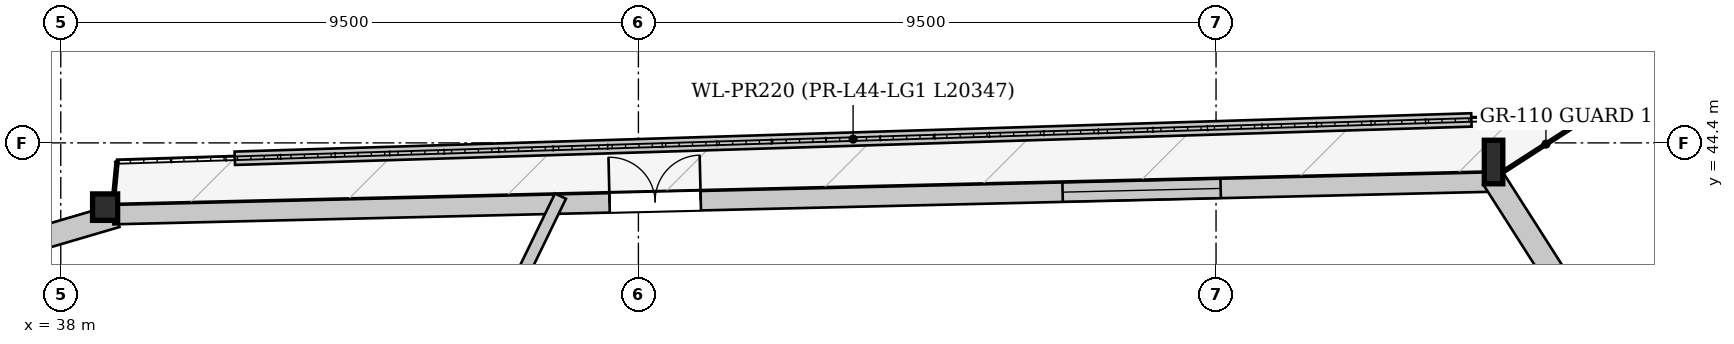
"""IFC4 building model, lengths in metres.
Left out: names, types, materials, properties, quantities, classifications, styles, units other than length and angle.
Written with IfcOpenShell. Run it as: python <this file> out.ifc"""

import sys

from ifc_helpers import new_model, si_unit, direction, frame, frame_2d, origin, origin_2d, place, context, subcontext, project, spatial, rectangle, i_section, extrude, source, transform, mapped, element, fill, save


model = new_model("IFC4")
c1 = context("Model", 3, precision=1e-05, world=origin(), true_north=direction((0.0, 1.0)))
c2 = subcontext(c1, "Body", "Model", "MODEL_VIEW")
j1 = project(units=[si_unit("LENGTHUNIT", "METRE"), si_unit("PLANEANGLEUNIT", "RADIAN")], contexts=[c1])
p1 = place(None, origin())
s1 = spatial("IfcSite", under=j1, at=p1, CompositionType="ELEMENT")
p2 = place(p1, origin())
s2 = spatial("IfcBuilding", under=s1, at=p2, CompositionType="ELEMENT")
p3 = place(p2, frame((0.0, 0.0, 167.9)))
s3 = spatial("IfcBuildingStorey", under=s2, at=p3, CompositionType="ELEMENT", Elevation=167.9)
m1 = source(origin(), c2, "Body", "SweptSolid", [
    extrude(i_section(OverallWidth=0.304, OverallDepth=0.716, WebThickness=0.021, FlangeThickness=0.04, at=origin_2d()), origin(), (0.0, 0.0, 1.0), 3.414),
])
p4 = place(p3, frame((61.715, 43.921, 0.0), z_axis=(-0.08816571419, 0.096531803858, 0.991417378144), x_axis=(-0.738378914552, -0.67438607529, 0.0)))
e1 = element("IfcColumn", 1, at=p4, inside=s3, PredefinedType="COLUMN", context=c2, shape_type="MappedRepresentation", body=[
    mapped(m1, transform((0.0, 0.0, 0.0), x_axis=(1.0, 0.0, 0.0), y_axis=(0.0, 1.0, 0.0), z_axis=(0.0, 0.0, 1.0), scale=1.0)),
])
m2 = source(origin(), c2, "Body", "SweptSolid", [
    extrude(i_section(OverallWidth=0.412, OverallDepth=0.435, WebThickness=0.031, FlangeThickness=0.05, at=origin_2d()), origin(), (0.0, 0.0, 1.0), 3.396),
])
p5 = place(p3, frame((38.858, 43.381, 0.0), z_axis=(-0.075996034496, -0.022072641997, 0.996863782679), x_axis=(0.278918309756, -0.96031483196, 0.0)))
e2 = element("IfcColumn", 2, at=p5, inside=s3, PredefinedType="COLUMN", context=c2, shape_type="MappedRepresentation", body=[
    mapped(m2, transform((0.0, 0.0, 0.0), x_axis=(1.0, 0.0, 0.0), y_axis=(0.0, 1.0, 0.0), z_axis=(0.0, 0.0, 1.0), scale=1.0)),
])
p6 = place(p3, frame((16.974, 36.761, 0.0), z_axis=(0.0, 0.0, 1.0), x_axis=(0.959540288507, 0.281571367032, 0.0)))
e3 = element("IfcWall", 3, at=p6, inside=s3, PredefinedType="SOLIDWALL", context=c2, shape_type="SweptSolid", body=[
    extrude(rectangle(XDim=22.863, YDim=0.38, at=frame_2d((11.431, 0.0))), origin(), (0.0, 0.0, 1.0), 2.722),
])
p7 = place(p6, frame((5.302, 0.0, 0.352)))
e4 = element("IfcOpeningElement", 4, at=p7, cuts=e3, PredefinedType="OPENING", context=c2, shape_type="SweptSolid", body=[
    extrude(rectangle(XDim=2.2, YDim=2.25, at=frame_2d((1.1, 1.125))), frame((0.0, 0.2, 0.0), z_axis=(0.0, -1.0, 0.0), x_axis=(1.0, 0.0, 0.0)), (0.0, 0.0, 1.0), 0.4),
])
p8 = place(p6, frame((15.361, 0.0, 0.352)))
e5 = element("IfcOpeningElement", 5, at=p8, cuts=e3, PredefinedType="OPENING", context=c2, shape_type="SweptSolid", body=[
    extrude(rectangle(XDim=2.2, YDim=2.25, at=frame_2d((1.1, 1.125))), frame((0.0, 0.2, 0.0), z_axis=(0.0, -1.0, 0.0), x_axis=(1.0, 0.0, 0.0)), (0.0, 0.0, 1.0), 0.4),
])
p9 = place(p3, frame((38.862, 43.221, 0.0), z_axis=(0.0, 0.0, 1.0), x_axis=(0.999721247149, 0.023609913133, 0.0)))
e6 = element("IfcWall", 6, at=p9, inside=s3, PredefinedType="SOLIDWALL", context=c2, shape_type="SweptSolid", body=[
    extrude(rectangle(XDim=22.863, YDim=0.32, at=frame_2d((11.432, 0.0))), origin(), (0.0, 0.0, 1.0), 2.722),
])
p10 = place(p9, frame((8.166, 0.0, 0.0)))
e7 = element("IfcOpeningElement", 7, at=p10, cuts=e6, PredefinedType="OPENING", context=c2, shape_type="SweptSolid", body=[
    extrude(rectangle(XDim=1.5, YDim=2.3, at=frame_2d((0.75, 1.15))), frame((0.0, 0.17, 0.0), z_axis=(0.0, -1.0, 0.0), x_axis=(1.0, 0.0, 0.0)), (0.0, 0.0, 1.0), 0.34),
])
p11 = place(p9, frame((15.619, 0.0, 0.252)))
e8 = element("IfcOpeningElement", 8, at=p11, cuts=e6, PredefinedType="OPENING", context=c2, shape_type="SweptSolid", body=[
    extrude(rectangle(XDim=2.6, YDim=2.35, at=frame_2d((1.3, 1.175))), frame((0.0, 0.17, 0.0), z_axis=(0.0, -1.0, 0.0), x_axis=(1.0, 0.0, 0.0)), (0.0, 0.0, 1.0), 0.34),
])
p12 = place(p3, frame((61.554, 43.818, 0.0), z_axis=(0.0, 0.0, 1.0), x_axis=(0.538043125275, -0.842917312282, 0.0)))
e9 = element("IfcWall", 9, at=p12, inside=s3, PredefinedType="SOLIDWALL", context=c2, shape_type="SweptSolid", body=[
    extrude(rectangle(XDim=3.367, YDim=0.38, at=frame_2d((1.684, 0.0))), origin(), (0.0, 0.0, 1.0), 2.722),
])
p13 = place(p3, frame((61.2, 44.778, 0.0), z_axis=(0.0, 0.0, 1.0), x_axis=(-0.999519608931, -0.030992763077, 0.0)))
e10 = element("IfcWall", 10, at=p13, inside=s3, PredefinedType="PARAPET", context=c2, shape_type="SweptSolid", body=[
    extrude(rectangle(XDim=20.347, YDim=0.22, at=frame_2d((10.174, 0.0))), origin(), (0.0, 0.0, 1.0), 0.3),
])
p14 = place(p3, frame((41.715, 34.25, 0.0), z_axis=(0.0, 0.0, 1.0), x_axis=(0.436811995944, 0.899552822351, 0.0)))
e11 = element("IfcWall", 11, at=p14, inside=s3, PredefinedType="PARTITIONING", context=c2, shape_type="SweptSolid", body=[
    extrude(rectangle(XDim=10.31, YDim=0.2, at=frame_2d((5.155, 0.0))), origin(), (0.0, 0.0, 1.0), 3.33),
])
m3 = source(origin(), c2, "Body", "SweptSolid", [
    extrude(rectangle(XDim=1.5, YDim=2.3, at=frame_2d((0.75, 1.15))), frame((0.0, 0.025, 0.0), z_axis=(0.0, -1.0, 0.0), x_axis=(1.0, 0.0, 0.0)), (0.0, 0.0, 1.0), 0.05),
])
p15 = place(p10, origin())
e12 = element("IfcDoor", 12, at=p15, inside=s3, OperationType="DOUBLE_DOOR_SINGLE_SWING", PredefinedType="DOOR", context=c2, shape_type="MappedRepresentation", body=[
    mapped(m3, transform((0.0, 0.0, 0.0), x_axis=(1.0, 0.0, 0.0), y_axis=(0.0, 1.0, 0.0), z_axis=(0.0, 0.0, 1.0), scale=1.0)),
])
fill(e7, e12)
m4 = source(origin(), c2, "Body", "SweptSolid", [
    extrude(rectangle(XDim=2.6, YDim=2.35, at=frame_2d((1.3, 1.175))), frame((0.0, 0.03, 0.0), z_axis=(0.0, -1.0, 0.0), x_axis=(1.0, 0.0, 0.0)), (0.0, 0.0, 1.0), 0.06),
])
p16 = place(p11, origin())
e13 = element("IfcWindow", 13, at=p16, inside=s3, PartitioningType="SINGLE_PANEL", PredefinedType="WINDOW", context=c2, shape_type="MappedRepresentation", body=[
    mapped(m4, transform((0.0, 0.0, 0.0), x_axis=(1.0, 0.0, 0.0), y_axis=(0.0, 1.0, 0.0), z_axis=(0.0, 0.0, 1.0), scale=1.0)),
])
fill(e8, e13)
save(model, sys.argv[1])
